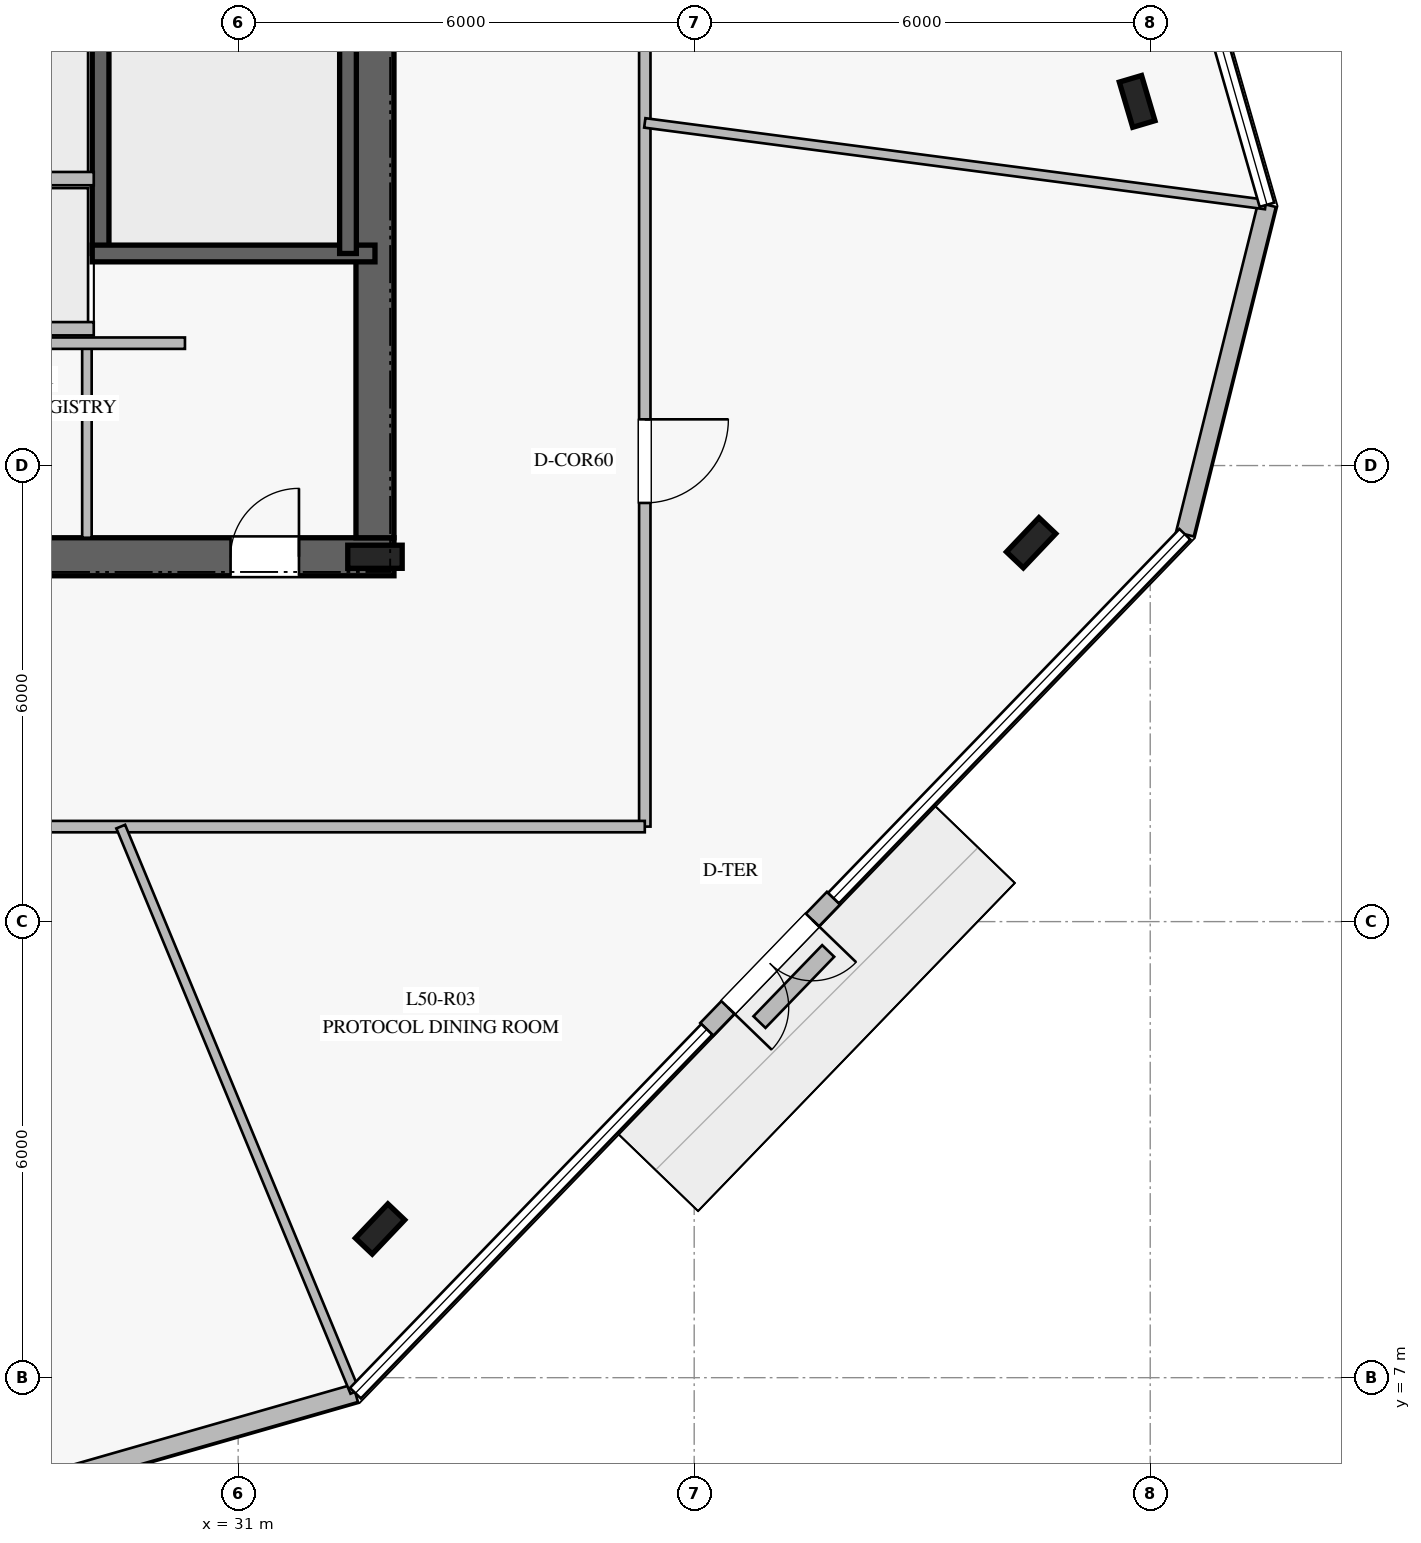
"""IFC4 building model, lengths in metres.
Left out: names, types, materials, properties, quantities, classifications, styles, units other than length and angle.
Written with IfcOpenShell. Run it as: python <this file> out.ifc"""

import sys

from ifc_helpers import new_model, si_unit, direction, frame, frame_2d, origin, origin_2d, place, context, subcontext, project, spatial, rectangle, i_section, extrude, element, fill, save


model = new_model("IFC4")
c1 = context("Model", 3, precision=1e-05, world=origin(), true_north=direction((0.0, 1.0)))
c2 = subcontext(c1, "Body", "Model", "MODEL_VIEW")
j1 = project(units=[si_unit("LENGTHUNIT", "METRE"), si_unit("PLANEANGLEUNIT", "RADIAN")], contexts=[c1])
p1 = place(None, origin())
s1 = spatial("IfcSite", under=j1, at=p1, CompositionType="ELEMENT")
p2 = place(p1, origin())
s2 = spatial("IfcBuilding", under=s1, at=p2, CompositionType="ELEMENT")
p3 = place(p2, frame((0.0, 0.0, 208.8)))
s3 = spatial("IfcBuildingStorey", under=s2, at=p3, CompositionType="ELEMENT", Elevation=208.8)
p4 = place(p3, frame((16.95, 17.8, 0.0), z_axis=(0.0, 0.0, 1.0), x_axis=(1.0, 0.0, 0.0)))
e1 = element("IfcWall", 1, at=p4, inside=s3, PredefinedType="SHEAR", context=c2, shape_type="SweptSolid", body=[
    extrude(rectangle(XDim=16.1, YDim=0.5, at=frame_2d((8.05, 0.0))), origin(), (0.0, 0.0, 1.0), 3.78),
])
p5 = place(p4, frame((5.0, 0.0, 0.0)))
e2 = element("IfcOpeningElement", 2, at=p5, cuts=e1, PredefinedType="OPENING", context=c2, shape_type="SweptSolid", body=[
    extrude(rectangle(XDim=1.2, YDim=2.25, at=frame_2d((0.6, 1.125))), frame((0.0, 0.26, 0.0), z_axis=(0.0, -1.0, 0.0), x_axis=(1.0, 0.0, 0.0)), (0.0, 0.0, 1.0), 0.52),
])
p6 = place(p4, frame((13.95, 0.0, 0.0)))
e3 = element("IfcOpeningElement", 3, at=p6, cuts=e1, PredefinedType="OPENING", context=c2, shape_type="SweptSolid", body=[
    extrude(rectangle(XDim=0.9, YDim=2.1, at=frame_2d((0.45, 1.05))), frame((0.0, 0.26, 0.0), z_axis=(0.0, -1.0, 0.0), x_axis=(1.0, 0.0, 0.0)), (0.0, 0.0, 1.0), 0.52),
])
p7 = place(p4, frame((9.2, 0.0, 0.0)))
e4 = element("IfcOpeningElement", 4, at=p7, cuts=e1, PredefinedType="OPENING", context=c2, shape_type="SweptSolid", body=[
    extrude(rectangle(XDim=1.1, YDim=2.2, at=frame_2d((0.55, 1.1))), frame((0.0, 0.26, 0.0), z_axis=(0.0, -1.0, 0.0), x_axis=(1.0, 0.0, 0.0)), (0.0, 0.0, 1.0), 0.52),
])
p8 = place(p3, frame((32.8, 18.05, 0.0), z_axis=(0.0, 0.0, 1.0), x_axis=(0.0, 1.0, 0.0)))
e5 = element("IfcWall", 5, at=p8, inside=s3, PredefinedType="SHEAR", context=c2, shape_type="SweptSolid", body=[
    extrude(rectangle(XDim=13.9, YDim=0.5, at=frame_2d((6.95, 0.0))), origin(), (0.0, 0.0, 1.0), 3.78),
])
p9 = place(p3, frame((32.8, 17.8, 0.0), z_axis=(0.0, 0.0, 1.0), x_axis=(1.0, 0.0, 0.0)))
e6 = element("IfcColumn", 6, at=p9, inside=s3, PredefinedType="COLUMN", context=c2, shape_type="SweptSolid", body=[
    extrude(i_section(OverallWidth=0.304, OverallDepth=0.716, WebThickness=0.021, FlangeThickness=0.04, at=origin_2d()), origin(), (0.0, 0.0, 1.0), 4.0),
])
p10 = place(p3, frame((29.19, 21.79, 0.0), z_axis=(0.0, 0.0, 1.0), x_axis=(0.0, 1.0, 0.0)))
e7 = element("IfcWall", 7, at=p10, inside=s3, PredefinedType="SOLIDWALL", context=c2, shape_type="SweptSolid", body=[
    extrude(rectangle(XDim=7.22, YDim=0.22, at=frame_2d((3.61, 0.0))), origin(), (0.0, 0.0, 1.0), 3.78),
])
p11 = place(p10, frame((5.88, 0.0, 0.0)))
e8 = element("IfcOpeningElement", 8, at=p11, cuts=e7, PredefinedType="OPENING", context=c2, shape_type="SweptSolid", body=[
    extrude(rectangle(XDim=1.15, YDim=2.2, at=frame_2d((0.575, 1.1))), frame((0.0, 0.12, 0.0), z_axis=(0.0, -1.0, 0.0), x_axis=(1.0, 0.0, 0.0)), (0.0, 0.0, 1.0), 0.24),
])
p12 = place(p3, frame((29.08, 21.79, 0.0), z_axis=(0.0, 0.0, 1.0), x_axis=(1.0, 0.0, 0.0)))
e9 = element("IfcWall", 9, at=p12, inside=s3, PredefinedType="SOLIDWALL", context=c2, shape_type="SweptSolid", body=[
    extrude(rectangle(XDim=3.72, YDim=0.22, at=frame_2d((1.86, 0.0))), origin(), (0.0, 0.0, 1.0), 3.78),
])
p13 = place(p3, frame((32.445, 29.01, 0.0), z_axis=(0.0, 0.0, 1.0), x_axis=(0.0, -1.0, 0.0)))
e10 = element("IfcWall", 10, at=p13, inside=s3, PredefinedType="SOLIDWALL", context=c2, shape_type="SweptSolid", body=[
    extrude(rectangle(XDim=7.22, YDim=0.22, at=frame_2d((3.61, 0.0))), origin(), (0.0, 0.0, 1.0), 3.78),
])
for number, where, z_axis, x_axis in (
    (11, (32.867, 8.956, 0.0), (0.0, 0.0, 1.0), (0.688, 0.725, 0.0)),
    (12, (41.433, 17.984, 0.0), (0.0, 0.0, 1.0), (0.688, 0.725, 0.0)),
    (13, (42.828, 23.791, 0.0), (0.0, 0.0, 1.0), (-0.284, 0.959, 0.0)),
):
    element("IfcColumn", number, at=place(p3, frame(where, z_axis=z_axis, x_axis=x_axis)), inside=s3, PredefinedType="COLUMN", context=c2, shape_type="SweptSolid", body=[
        extrude(i_section(OverallWidth=0.305, OverallDepth=0.62, WebThickness=0.021, FlangeThickness=0.04, at=origin_2d()), origin(), (0.0, 0.0, 1.0), 4.0),
    ])
p14 = place(p3, frame((28.249, 5.565, 0.0), z_axis=(0.0, 0.0, 1.0), x_axis=(0.961280198868, 0.275572820258, 0.0)))
e14 = element("IfcWall", 14, at=p14, inside=s3, PredefinedType="STANDARD", context=c2, shape_type="SweptSolid", body=[
    extrude(rectangle(XDim=4.467, YDim=0.24, at=frame_2d((2.233, 0.0))), origin(), (0.0, 0.0, 1.0), 3.78),
])
p15 = place(p3, frame((37.166, 11.583, 0.0), z_axis=(0.0, 0.0, 1.0), x_axis=(0.694688923552, 0.719310294305, 0.0)))
e15 = element("IfcWall", 15, at=p15, inside=s3, PredefinedType="STANDARD", context=c2, shape_type="SweptSolid", body=[
    extrude(rectangle(XDim=2.4, YDim=0.24, at=frame_2d((1.2, 0.0))), origin(), (0.0, 0.0, 1.0), 3.78),
])
p16 = place(p15, frame((0.4, 0.0, 0.0)))
e16 = element("IfcOpeningElement", 16, at=p16, cuts=e15, PredefinedType="OPENING", context=c2, shape_type="SweptSolid", body=[
    extrude(rectangle(XDim=1.6, YDim=2.25, at=frame_2d((0.8, 1.125))), frame((0.0, 0.13, 0.0), z_axis=(0.0, -1.0, 0.0), x_axis=(1.0, 0.0, 0.0)), (0.0, 0.0, 1.0), 0.26),
])
p17 = place(p3, frame((43.456, 18.096, 0.0), z_axis=(0.0, 0.0, 1.0), x_axis=(0.241712587921, 0.970347888564, 0.0)))
e17 = element("IfcWall", 17, at=p17, inside=s3, PredefinedType="STANDARD", context=c2, shape_type="SweptSolid", body=[
    extrude(rectangle(XDim=4.468, YDim=0.24, at=frame_2d((2.234, 0.0))), origin(), (0.0, 0.0, 1.0), 3.78),
])
p18 = place(p3, frame((37.859, 11.678, 0.0), z_axis=(0.0, 0.0, 1.0), x_axis=(0.694711687204, 0.719288309138, 0.0)))
e18 = element("IfcWall", 18, at=p18, inside=s3, PredefinedType="USERDEFINED", context=c2, shape_type="SweptSolid", body=[
    extrude(rectangle(XDim=1.301, YDim=0.22, at=frame_2d((0.651, 0.0))), origin(), (0.0, 0.0, 1.0), 0.4),
])
p19 = place(p3, frame((29.01, 18.05, 0.0), z_axis=(0.0, 0.0, 1.0), x_axis=(0.0, 1.0, 0.0)))
e19 = element("IfcWall", 19, at=p19, inside=s3, PredefinedType="PARTITIONING", context=c2, shape_type="SweptSolid", body=[
    extrude(rectangle(XDim=2.5, YDim=0.125, at=frame_2d((1.25, 0.0))), origin(), (0.0, 0.0, 1.0), 3.78),
])
p20 = place(p3, frame((24.4, 20.61, 0.0), z_axis=(0.0, 0.0, 1.0), x_axis=(1.0, 0.0, 0.0)))
e20 = element("IfcWall", 20, at=p20, inside=s3, PredefinedType="PARTITIONING", context=c2, shape_type="SweptSolid", body=[
    extrude(rectangle(XDim=5.9, YDim=0.15, at=frame_2d((2.95, 0.0))), origin(), (0.0, 0.0, 1.0), 3.78),
])
for number, where, z_axis, x_axis in (
    (21, (26.75, 20.8, 0.0), (0.0, 0.0, 1.0), (1.0, 0.0, 0.0)),
    (22, (26.75, 22.775, 0.0), (0.0, 0.0, 1.0), (1.0, 0.0, 0.0)),
):
    element("IfcWall", number, at=place(p3, frame(where, z_axis=z_axis, x_axis=x_axis)), inside=s3, PredefinedType="PARTITIONING", context=c2, shape_type="SweptSolid", body=[
        extrude(rectangle(XDim=2.35, YDim=0.175, at=frame_2d((1.175, 0.0))), origin(), (0.0, 0.0, 1.0), 3.78),
    ])
p21 = place(p3, frame((36.35, 35.75, 0.0), z_axis=(0.0, 0.0, 1.0), x_axis=(0.0, -1.0, 0.0)))
e23 = element("IfcWall", 23, at=p21, inside=s3, PredefinedType="PARTITIONING", context=c2, shape_type="SweptSolid", body=[
    extrude(rectangle(XDim=21.5, YDim=0.15, at=frame_2d((10.75, 0.0))), origin(), (0.0, 0.0, 1.0), 3.05),
])
p22 = place(p21, frame((16.142, 0.0, 0.0)))
e24 = element("IfcOpeningElement", 24, at=p22, cuts=e23, PredefinedType="OPENING", context=c2, shape_type="SweptSolid", body=[
    extrude(rectangle(XDim=1.1, YDim=2.2, at=frame_2d((0.55, 1.1))), frame((0.0, 0.085, 0.0), z_axis=(0.0, -1.0, 0.0), x_axis=(1.0, 0.0, 0.0)), (0.0, 0.0, 1.0), 0.17),
])
p23 = place(p21, frame((6.148, 0.0, 0.0)))
e25 = element("IfcOpeningElement", 25, at=p23, cuts=e23, PredefinedType="OPENING", context=c2, shape_type="SweptSolid", body=[
    extrude(rectangle(XDim=1.1, YDim=2.2, at=frame_2d((0.55, 1.1))), frame((0.0, 0.085, 0.0), z_axis=(0.0, -1.0, 0.0), x_axis=(1.0, 0.0, 0.0)), (0.0, 0.0, 1.0), 0.17),
])
p24 = place(p3, frame((36.35, 14.25, 0.0), z_axis=(0.0, 0.0, 1.0), x_axis=(-1.0, 0.0, 0.0)))
e26 = element("IfcWall", 26, at=p24, inside=s3, PredefinedType="PARTITIONING", context=c2, shape_type="SweptSolid", body=[
    extrude(rectangle(XDim=22.7, YDim=0.15, at=frame_2d((11.35, 0.0))), origin(), (0.0, 0.0, 1.0), 3.28),
])
p25 = place(p24, frame((18.963, 0.0, 0.0)))
e27 = element("IfcOpeningElement", 27, at=p25, cuts=e26, PredefinedType="OPENING", context=c2, shape_type="SweptSolid", body=[
    extrude(rectangle(XDim=1.1, YDim=2.2, at=frame_2d((0.55, 1.1))), frame((0.0, 0.085, 0.0), z_axis=(0.0, -1.0, 0.0), x_axis=(1.0, 0.0, 0.0)), (0.0, 0.0, 1.0), 0.17),
])
p26 = place(p24, frame((11.138, 0.0, 0.0)))
e28 = element("IfcOpeningElement", 28, at=p26, cuts=e26, PredefinedType="OPENING", context=c2, shape_type="SweptSolid", body=[
    extrude(rectangle(XDim=1.1, YDim=2.2, at=frame_2d((0.55, 1.1))), frame((0.0, 0.085, 0.0), z_axis=(0.0, -1.0, 0.0), x_axis=(1.0, 0.0, 0.0)), (0.0, 0.0, 1.0), 0.17),
])
p27 = place(p3, frame((29.455, 14.25, 0.0), z_axis=(0.0, 0.0, 1.0), x_axis=(0.382715181566, -0.923866380923, 0.0)))
e29 = element("IfcWall", 29, at=p27, inside=s3, PredefinedType="PARTITIONING", context=c2, shape_type="SweptSolid", body=[
    extrude(rectangle(XDim=8.05, YDim=0.125, at=frame_2d((4.025, 0.0))), origin(), (0.0, 0.0, 1.0), 3.18),
])
p28 = place(p3, frame((36.35, 23.508, 0.0), z_axis=(0.0, 0.0, 1.0), x_axis=(0.991466193804, -0.130364053878, 0.0)))
e30 = element("IfcWall", 30, at=p28, inside=s3, PredefinedType="PARTITIONING", context=c2, shape_type="SweptSolid", body=[
    extrude(rectangle(XDim=8.238, YDim=0.125, at=frame_2d((4.119, 0.0))), origin(), (0.0, 0.0, 1.0), 3.05),
])
p29 = place(p16, frame((1.6, 0.0, 0.0), z_axis=(0.0, 0.0, 1.0), x_axis=(-1.0, 0.0, 0.0)))
e31 = element("IfcDoor", 31, at=p29, inside=s3, OperationType="DOUBLE_DOOR_SINGLE_SWING", PredefinedType="DOOR", context=c2, shape_type="SweptSolid", body=[
    extrude(rectangle(XDim=1.6, YDim=2.25, at=frame_2d((0.8, 1.125))), frame((0.0, 0.025, 0.0), z_axis=(0.0, -1.0, 0.0), x_axis=(1.0, 0.0, 0.0)), (0.0, 0.0, 1.0), 0.05),
])
fill(e16, e31)
p30 = place(p6, origin())
e32 = element("IfcDoor", 32, at=p30, inside=s3, OperationType="SINGLE_SWING_RIGHT", PredefinedType="DOOR", context=c2, shape_type="SweptSolid", body=[
    extrude(rectangle(XDim=0.9, YDim=2.1, at=frame_2d((0.45, 1.05))), frame((0.0, 0.025, 0.0), z_axis=(0.0, -1.0, 0.0), x_axis=(1.0, 0.0, 0.0)), (0.0, 0.0, 1.0), 0.05),
])
fill(e3, e32)
p31 = place(p22, origin())
e33 = element("IfcDoor", 33, at=p31, inside=s3, OperationType="SINGLE_SWING_LEFT", PredefinedType="DOOR", context=c2, shape_type="SweptSolid", body=[
    extrude(rectangle(XDim=1.1, YDim=2.2, at=frame_2d((0.55, 1.1))), frame((0.0, 0.025, 0.0), z_axis=(0.0, -1.0, 0.0), x_axis=(1.0, 0.0, 0.0)), (0.0, 0.0, 1.0), 0.05),
])
fill(e24, e33)
save(model, sys.argv[1])
